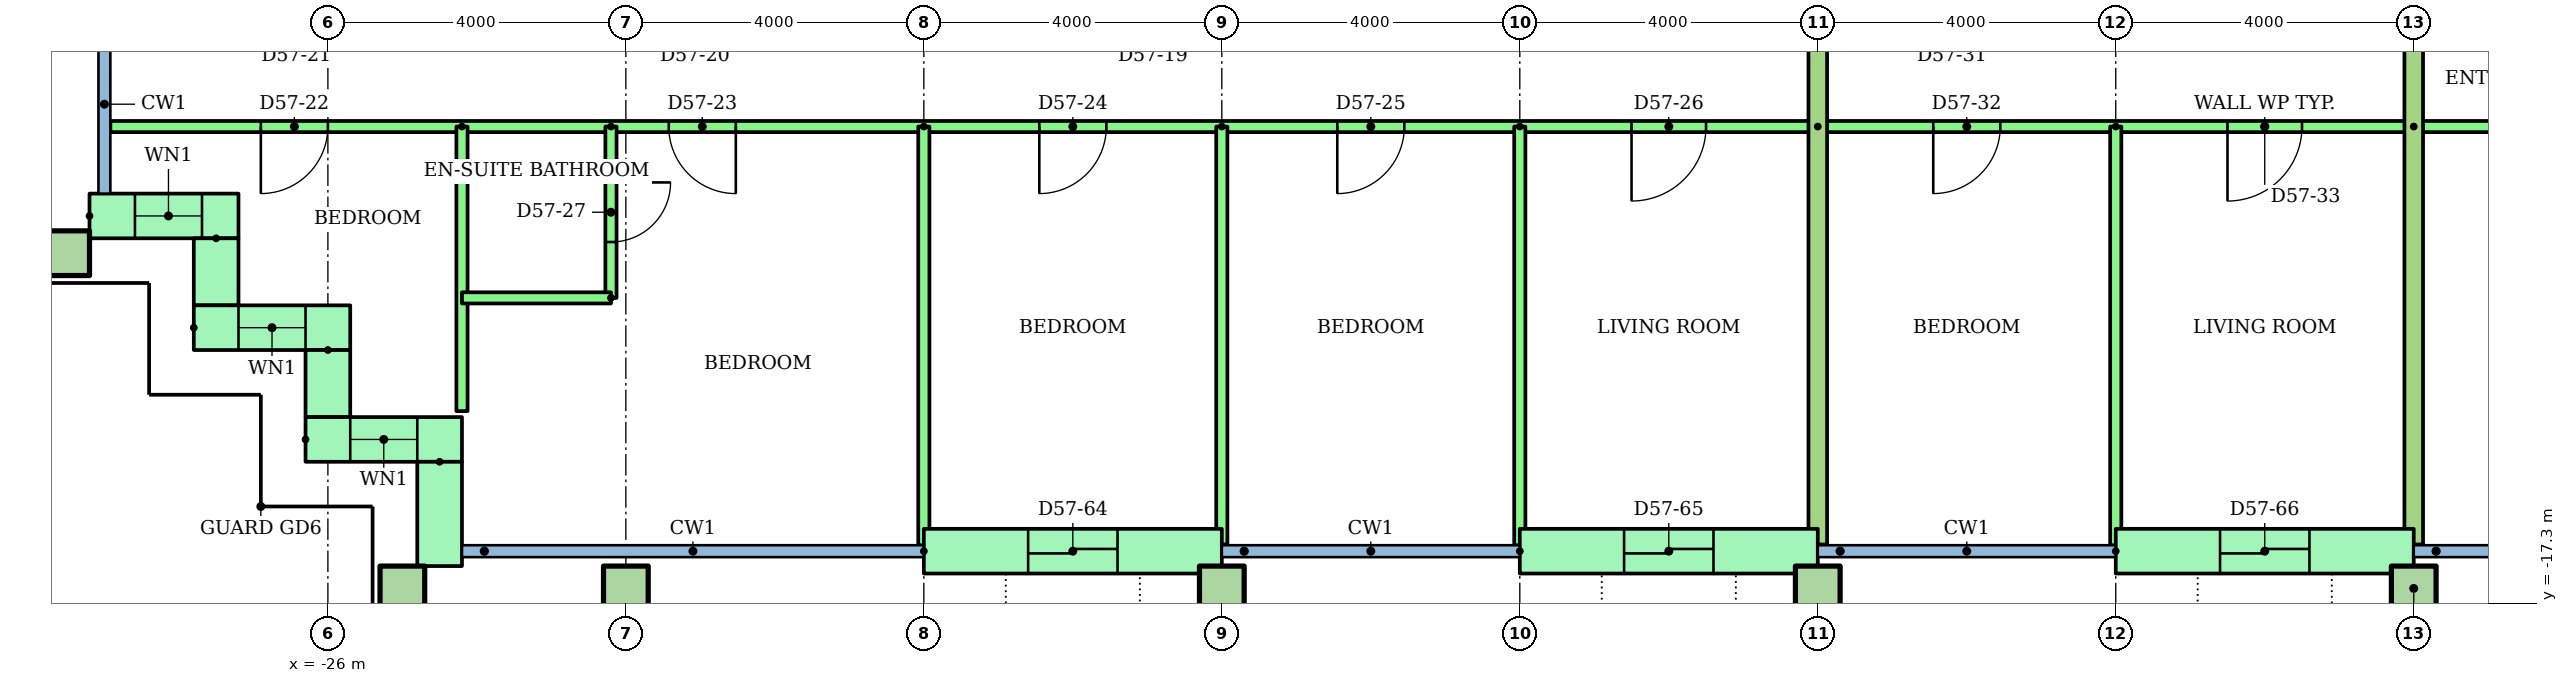
"""IFC4 building model, lengths in metres.
Left out: names, types, materials, properties, quantities, classifications, styles, units other than length and angle.
Written with IfcOpenShell. Run it as: python <this file> out.ifc"""

import sys

from ifc_helpers import new_model, si_unit, direction, frame, frame_2d, origin, origin_2d, place, context, subcontext, project, spatial, rectangle, hollow_rectangle, extrude, element, fill, save


model = new_model("IFC4")
c1 = context("Model", 3, precision=1e-05, world=origin(), true_north=direction((0.0, 1.0)))
c2 = subcontext(c1, "Body", "Model", "MODEL_VIEW")
j1 = project(units=[si_unit("LENGTHUNIT", "METRE"), si_unit("PLANEANGLEUNIT", "RADIAN")], contexts=[c1])
p1 = place(None, origin())
s1 = spatial("IfcSite", under=j1, at=p1, CompositionType="ELEMENT")
p2 = place(p1, origin())
s2 = spatial("IfcBuilding", under=s1, at=p2, CompositionType="ELEMENT")
p3 = place(p2, frame((0.0, 0.0, 220.4)))
s3 = spatial("IfcBuildingStorey", under=s2, at=p3, CompositionType="ELEMENT", Elevation=220.4)
for number, where in (
    (1, (-25.0, -17.1, 0.0)),
    (2, (-22.0, -17.1, 0.0)),
    (3, (-14.0, -17.1, 0.0)),
    (4, (-6.0, -17.1, 0.0)),
    (5, (2.0, -17.1, 0.0)),
    (6, (-29.5, -12.6, 0.0)),
):
    element("IfcColumn", number, at=place(p3, frame(where)), inside=s3, PredefinedType="COLUMN", context=c2, shape_type="SweptSolid", body=[
        extrude(hollow_rectangle(XDim=0.6, YDim=0.6, WallThickness=0.03, at=origin_2d()), origin(), (0.0, 0.0, 1.0), 3.2),
    ])
p4 = place(p3, frame((-29.2, -12.1, 0.0)))
e7 = element("IfcWall", 7, at=p4, inside=s3, PredefinedType="STANDARD", context=c2, shape_type="SweptSolid", body=[
    extrude(rectangle(XDim=2.0, YDim=0.6, at=frame_2d((1.0, 0.0))), origin(), (0.0, 0.0, 1.0), 2.92),
])
p5 = place(p4, frame((0.61, 0.0, 0.9)))
e8 = element("IfcOpeningElement", 8, at=p5, cuts=e7, PredefinedType="OPENING", context=c2, shape_type="SweptSolid", body=[
    extrude(rectangle(XDim=0.9, YDim=1.5, at=frame_2d((0.45, 0.75))), frame((0.0, 0.31, 0.0), z_axis=(0.0, -1.0, 0.0), x_axis=(1.0, 0.0, 0.0)), (0.0, 0.0, 1.0), 0.62),
])
p6 = place(p3, frame((-27.5, -12.4, 0.0), z_axis=(0.0, 0.0, 1.0), x_axis=(0.0, -1.0, 0.0)))
e9 = element("IfcWall", 9, at=p6, inside=s3, PredefinedType="STANDARD", context=c2, shape_type="SweptSolid", body=[
    extrude(rectangle(XDim=0.9, YDim=0.6, at=frame_2d((0.45, 0.0))), origin(), (0.0, 0.0, 1.0), 2.92),
])
p7 = place(p3, frame((-27.8, -13.6, 0.0)))
e10 = element("IfcWall", 10, at=p7, inside=s3, PredefinedType="STANDARD", context=c2, shape_type="SweptSolid", body=[
    extrude(rectangle(XDim=2.1, YDim=0.6, at=frame_2d((1.05, 0.0))), origin(), (0.0, 0.0, 1.0), 2.92),
])
p8 = place(p7, frame((0.6, 0.0, 0.9)))
e11 = element("IfcOpeningElement", 11, at=p8, cuts=e10, PredefinedType="OPENING", context=c2, shape_type="SweptSolid", body=[
    extrude(rectangle(XDim=0.9, YDim=1.5, at=frame_2d((0.45, 0.75))), frame((0.0, 0.31, 0.0), z_axis=(0.0, -1.0, 0.0), x_axis=(1.0, 0.0, 0.0)), (0.0, 0.0, 1.0), 0.62),
])
p9 = place(p3, frame((-26.0, -13.9, 0.0), z_axis=(0.0, 0.0, 1.0), x_axis=(0.0, -1.0, 0.0)))
e12 = element("IfcWall", 12, at=p9, inside=s3, PredefinedType="STANDARD", context=c2, shape_type="SweptSolid", body=[
    extrude(rectangle(XDim=0.9, YDim=0.6, at=frame_2d((0.45, 0.0))), origin(), (0.0, 0.0, 1.0), 2.92),
])
p10 = place(p3, frame((-26.3, -15.1, 0.0)))
e13 = element("IfcWall", 13, at=p10, inside=s3, PredefinedType="STANDARD", context=c2, shape_type="SweptSolid", body=[
    extrude(rectangle(XDim=2.1, YDim=0.6, at=frame_2d((1.05, 0.0))), origin(), (0.0, 0.0, 1.0), 2.92),
])
p11 = place(p10, frame((0.6, 0.0, 0.9)))
e14 = element("IfcOpeningElement", 14, at=p11, cuts=e13, PredefinedType="OPENING", context=c2, shape_type="SweptSolid", body=[
    extrude(rectangle(XDim=0.9, YDim=1.5, at=frame_2d((0.45, 0.75))), frame((0.0, 0.31, 0.0), z_axis=(0.0, -1.0, 0.0), x_axis=(1.0, 0.0, 0.0)), (0.0, 0.0, 1.0), 0.62),
])
p12 = place(p3, frame((-24.5, -15.4, 0.0), z_axis=(0.0, 0.0, 1.0), x_axis=(0.0, -1.0, 0.0)))
e15 = element("IfcWall", 15, at=p12, inside=s3, PredefinedType="STANDARD", context=c2, shape_type="SweptSolid", body=[
    extrude(rectangle(XDim=1.4, YDim=0.6, at=frame_2d((0.7, 0.0))), origin(), (0.0, 0.0, 1.0), 2.92),
])
p13 = place(p3, frame((-18.0, -16.6, 0.0)))
e16 = element("IfcWall", 16, at=p13, inside=s3, PredefinedType="STANDARD", context=c2, shape_type="SweptSolid", body=[
    extrude(rectangle(XDim=4.0, YDim=0.6, at=frame_2d((2.0, 0.0))), origin(), (0.0, 0.0, 1.0), 2.92),
])
p14 = place(p13, frame((1.4, 0.0, 0.0)))
e17 = element("IfcOpeningElement", 17, at=p14, cuts=e16, PredefinedType="OPENING", context=c2, shape_type="SweptSolid", body=[
    extrude(rectangle(XDim=1.2, YDim=2.1, at=frame_2d((0.6, 1.05))), frame((0.0, 0.31, 0.0), z_axis=(0.0, -1.0, 0.0), x_axis=(1.0, 0.0, 0.0)), (0.0, 0.0, 1.0), 0.62),
])
p15 = place(p3, frame((-10.0, -16.6, 0.0)))
e18 = element("IfcWall", 18, at=p15, inside=s3, PredefinedType="STANDARD", context=c2, shape_type="SweptSolid", body=[
    extrude(rectangle(XDim=4.0, YDim=0.6, at=frame_2d((2.0, 0.0))), origin(), (0.0, 0.0, 1.0), 2.92),
])
p16 = place(p15, frame((1.4, 0.0, 0.0)))
e19 = element("IfcOpeningElement", 19, at=p16, cuts=e18, PredefinedType="OPENING", context=c2, shape_type="SweptSolid", body=[
    extrude(rectangle(XDim=1.2, YDim=2.1, at=frame_2d((0.6, 1.05))), frame((0.0, 0.31, 0.0), z_axis=(0.0, -1.0, 0.0), x_axis=(1.0, 0.0, 0.0)), (0.0, 0.0, 1.0), 0.62),
])
p17 = place(p3, frame((-2.0, -16.6, 0.0)))
e20 = element("IfcWall", 20, at=p17, inside=s3, PredefinedType="STANDARD", context=c2, shape_type="SweptSolid", body=[
    extrude(rectangle(XDim=4.0, YDim=0.6, at=frame_2d((2.0, 0.0))), origin(), (0.0, 0.0, 1.0), 2.92),
])
p18 = place(p17, frame((1.4, 0.0, 0.0)))
e21 = element("IfcOpeningElement", 21, at=p18, cuts=e20, PredefinedType="OPENING", context=c2, shape_type="SweptSolid", body=[
    extrude(rectangle(XDim=1.2, YDim=2.1, at=frame_2d((0.6, 1.05))), frame((0.0, 0.31, 0.0), z_axis=(0.0, -1.0, 0.0), x_axis=(1.0, 0.0, 0.0)), (0.0, 0.0, 1.0), 0.62),
])
p19 = place(p3, frame((-6.0, -10.9, 0.0), z_axis=(0.0, 0.0, 1.0), x_axis=(-1.0, 0.0, 0.0)))
e22 = element("IfcWall", 22, at=p19, inside=s3, PredefinedType="PARTITIONING", context=c2, shape_type="SweptSolid", body=[
    extrude(rectangle(XDim=22.92, YDim=0.15, at=frame_2d((11.46, 0.0))), origin(), (0.0, 0.0, 1.0), 2.4),
])
p20 = place(p19, frame((20.0, 0.0, 0.0)))
e23 = element("IfcOpeningElement", 23, at=p20, cuts=e22, PredefinedType="OPENING", context=c2, shape_type="SweptSolid", body=[
    extrude(rectangle(XDim=0.9, YDim=2.1, at=frame_2d((0.45, 1.05))), frame((0.0, 0.085, 0.0), z_axis=(0.0, -1.0, 0.0), x_axis=(1.0, 0.0, 0.0)), (0.0, 0.0, 1.0), 0.17),
])
p21 = place(p19, frame((14.524, 0.0, 0.0)))
e24 = element("IfcOpeningElement", 24, at=p21, cuts=e22, PredefinedType="OPENING", context=c2, shape_type="SweptSolid", body=[
    extrude(rectangle(XDim=0.9, YDim=2.1, at=frame_2d((0.45, 1.05))), frame((0.0, 0.085, 0.0), z_axis=(0.0, -1.0, 0.0), x_axis=(1.0, 0.0, 0.0)), (0.0, 0.0, 1.0), 0.17),
])
p22 = place(p19, frame((9.55, 0.0, 0.0)))
e25 = element("IfcOpeningElement", 25, at=p22, cuts=e22, PredefinedType="OPENING", context=c2, shape_type="SweptSolid", body=[
    extrude(rectangle(XDim=0.9, YDim=2.1, at=frame_2d((0.45, 1.05))), frame((0.0, 0.085, 0.0), z_axis=(0.0, -1.0, 0.0), x_axis=(1.0, 0.0, 0.0)), (0.0, 0.0, 1.0), 0.17),
])
p23 = place(p19, frame((5.55, 0.0, 0.0)))
e26 = element("IfcOpeningElement", 26, at=p23, cuts=e22, PredefinedType="OPENING", context=c2, shape_type="SweptSolid", body=[
    extrude(rectangle(XDim=0.9, YDim=2.1, at=frame_2d((0.45, 1.05))), frame((0.0, 0.085, 0.0), z_axis=(0.0, -1.0, 0.0), x_axis=(1.0, 0.0, 0.0)), (0.0, 0.0, 1.0), 0.17),
])
p24 = place(p19, frame((1.5, 0.0, 0.0)))
e27 = element("IfcOpeningElement", 27, at=p24, cuts=e22, PredefinedType="OPENING", context=c2, shape_type="SweptSolid", body=[
    extrude(rectangle(XDim=1.0, YDim=2.1, at=frame_2d((0.5, 1.05))), frame((0.0, 0.085, 0.0), z_axis=(0.0, -1.0, 0.0), x_axis=(1.0, 0.0, 0.0)), (0.0, 0.0, 1.0), 0.17),
])
p25 = place(p3, frame((-24.2, -10.9, 0.0), z_axis=(0.0, 0.0, 1.0), x_axis=(0.0, -1.0, 0.0)))
e28 = element("IfcWall", 28, at=p25, inside=s3, PredefinedType="PARTITIONING", context=c2, shape_type="SweptSolid", body=[
    extrude(rectangle(XDim=3.82, YDim=0.15, at=frame_2d((1.91, 0.0))), origin(), (0.0, 0.0, 1.0), 2.4),
])
p26 = place(p3, frame((-18.0, -10.9, 0.0), z_axis=(0.0, 0.0, 1.0), x_axis=(0.0, -1.0, 0.0)))
e29 = element("IfcWall", 29, at=p26, inside=s3, PredefinedType="PARTITIONING", context=c2, shape_type="SweptSolid", body=[
    extrude(rectangle(XDim=5.621, YDim=0.15, at=frame_2d((2.811, 0.0))), origin(), (0.0, 0.0, 1.0), 2.4),
])
p27 = place(p3, frame((-14.0, -10.9, 0.0), z_axis=(0.0, 0.0, 1.0), x_axis=(0.0, -1.0, 0.0)))
e30 = element("IfcWall", 30, at=p27, inside=s3, PredefinedType="PARTITIONING", context=c2, shape_type="SweptSolid", body=[
    extrude(rectangle(XDim=5.61, YDim=0.15, at=frame_2d((2.805, 0.0))), origin(), (0.0, 0.0, 1.0), 2.4),
])
p28 = place(p3, frame((-10.0, -10.9, 0.0), z_axis=(0.0, 0.0, 1.0), x_axis=(0.0, -1.0, 0.0)))
e31 = element("IfcWall", 31, at=p28, inside=s3, PredefinedType="PARTITIONING", context=c2, shape_type="SweptSolid", body=[
    extrude(rectangle(XDim=5.621, YDim=0.15, at=frame_2d((2.811, 0.0))), origin(), (0.0, 0.0, 1.0), 2.4),
])
p29 = place(p3, frame((-22.2, -10.9, 0.0), z_axis=(0.0, 0.0, 1.0), x_axis=(0.0, -1.0, 0.0)))
e32 = element("IfcWall", 32, at=p29, inside=s3, PredefinedType="PARTITIONING", context=c2, shape_type="SweptSolid", body=[
    extrude(rectangle(XDim=2.3, YDim=0.15, at=frame_2d((1.15, 0.0))), origin(), (0.0, 0.0, 1.0), 2.4),
])
p30 = place(p29, frame((0.75, 0.0, 0.0)))
e33 = element("IfcOpeningElement", 33, at=p30, cuts=e32, PredefinedType="OPENING", context=c2, shape_type="SweptSolid", body=[
    extrude(rectangle(XDim=0.8, YDim=2.1, at=frame_2d((0.4, 1.05))), frame((0.0, 0.085, 0.0), z_axis=(0.0, -1.0, 0.0), x_axis=(1.0, 0.0, 0.0)), (0.0, 0.0, 1.0), 0.17),
])
p31 = place(p3, frame((-22.2, -13.2, 0.0), z_axis=(0.0, 0.0, 1.0), x_axis=(-1.0, 0.0, 0.0)))
e34 = element("IfcWall", 34, at=p31, inside=s3, PredefinedType="PARTITIONING", context=c2, shape_type="SweptSolid", body=[
    extrude(rectangle(XDim=2.0, YDim=0.15, at=frame_2d((1.0, 0.0))), origin(), (0.0, 0.0, 1.0), 2.4),
])
p32 = place(p3, frame((2.0, -10.9, 0.0), z_axis=(0.0, 0.0, 1.0), x_axis=(-1.0, 0.0, 0.0)))
e35 = element("IfcWall", 35, at=p32, inside=s3, PredefinedType="PARTITIONING", context=c2, shape_type="SweptSolid", body=[
    extrude(rectangle(XDim=8.0, YDim=0.15, at=frame_2d((4.0, 0.0))), origin(), (0.0, 0.0, 1.0), 2.4),
])
p33 = place(p32, frame((5.55, 0.0, 0.0)))
e36 = element("IfcOpeningElement", 36, at=p33, cuts=e35, PredefinedType="OPENING", context=c2, shape_type="SweptSolid", body=[
    extrude(rectangle(XDim=0.9, YDim=2.1, at=frame_2d((0.45, 1.05))), frame((0.0, 0.085, 0.0), z_axis=(0.0, -1.0, 0.0), x_axis=(1.0, 0.0, 0.0)), (0.0, 0.0, 1.0), 0.17),
])
p34 = place(p32, frame((1.5, 0.0, 0.0)))
e37 = element("IfcOpeningElement", 37, at=p34, cuts=e35, PredefinedType="OPENING", context=c2, shape_type="SweptSolid", body=[
    extrude(rectangle(XDim=1.0, YDim=2.1, at=frame_2d((0.5, 1.05))), frame((0.0, 0.085, 0.0), z_axis=(0.0, -1.0, 0.0), x_axis=(1.0, 0.0, 0.0)), (0.0, 0.0, 1.0), 0.17),
])
p35 = place(p3, frame((-2.0, -10.9, 0.0), z_axis=(0.0, 0.0, 1.0), x_axis=(0.0, -1.0, 0.0)))
e38 = element("IfcWall", 38, at=p35, inside=s3, PredefinedType="PARTITIONING", context=c2, shape_type="SweptSolid", body=[
    extrude(rectangle(XDim=5.621, YDim=0.15, at=frame_2d((2.811, 0.0))), origin(), (0.0, 0.0, 1.0), 2.4),
])
p36 = place(p3, frame((-6.0, -1.4, 0.0), z_axis=(0.0, 0.0, 1.0), x_axis=(0.0, -1.0, 0.0)))
e39 = element("IfcWall", 39, at=p36, inside=s3, PredefinedType="PARTITIONING", context=c2, shape_type="SweptSolid", body=[
    extrude(rectangle(XDim=15.11, YDim=0.25, at=frame_2d((7.555, 0.0))), origin(), (0.0, 0.0, 1.0), 2.4),
])
p37 = place(p3, frame((28.92, -10.9, 0.0), z_axis=(0.0, 0.0, 1.0), x_axis=(-1.0, 0.0, 0.0)))
e40 = element("IfcWall", 40, at=p37, inside=s3, PredefinedType="PARTITIONING", context=c2, shape_type="SweptSolid", body=[
    extrude(rectangle(XDim=26.92, YDim=0.15, at=frame_2d((13.46, 0.0))), origin(), (0.0, 0.0, 1.0), 2.4),
])
p38 = place(p37, frame((22.42, 0.0, 0.0)))
e41 = element("IfcOpeningElement", 41, at=p38, cuts=e40, PredefinedType="OPENING", context=c2, shape_type="SweptSolid", body=[
    extrude(rectangle(XDim=1.0, YDim=2.1, at=frame_2d((0.5, 1.05))), frame((0.0, 0.085, 0.0), z_axis=(0.0, -1.0, 0.0), x_axis=(1.0, 0.0, 0.0)), (0.0, 0.0, 1.0), 0.17),
])
p39 = place(p37, frame((16.47, 0.0, 0.0)))
e42 = element("IfcOpeningElement", 42, at=p39, cuts=e40, PredefinedType="OPENING", context=c2, shape_type="SweptSolid", body=[
    extrude(rectangle(XDim=0.9, YDim=2.1, at=frame_2d((0.45, 1.05))), frame((0.0, 0.085, 0.0), z_axis=(0.0, -1.0, 0.0), x_axis=(1.0, 0.0, 0.0)), (0.0, 0.0, 1.0), 0.17),
])
p40 = place(p37, frame((12.47, 0.0, 0.0)))
e43 = element("IfcOpeningElement", 43, at=p40, cuts=e40, PredefinedType="OPENING", context=c2, shape_type="SweptSolid", body=[
    extrude(rectangle(XDim=0.9, YDim=2.1, at=frame_2d((0.45, 1.05))), frame((0.0, 0.085, 0.0), z_axis=(0.0, -1.0, 0.0), x_axis=(1.0, 0.0, 0.0)), (0.0, 0.0, 1.0), 0.17),
])
p41 = place(p37, frame((7.27, 0.0, 0.0)))
e44 = element("IfcOpeningElement", 44, at=p41, cuts=e40, PredefinedType="OPENING", context=c2, shape_type="SweptSolid", body=[
    extrude(rectangle(XDim=0.9, YDim=2.1, at=frame_2d((0.45, 1.05))), frame((0.0, 0.085, 0.0), z_axis=(0.0, -1.0, 0.0), x_axis=(1.0, 0.0, 0.0)), (0.0, 0.0, 1.0), 0.17),
])
p42 = place(p37, frame((1.544, 0.0, 0.0)))
e45 = element("IfcOpeningElement", 45, at=p42, cuts=e40, PredefinedType="OPENING", context=c2, shape_type="SweptSolid", body=[
    extrude(rectangle(XDim=0.9, YDim=2.1, at=frame_2d((0.45, 1.05))), frame((0.0, 0.085, 0.0), z_axis=(0.0, -1.0, 0.0), x_axis=(1.0, 0.0, 0.0)), (0.0, 0.0, 1.0), 0.17),
])
p43 = place(p3, frame((2.0, -1.4, 0.0), z_axis=(0.0, 0.0, 1.0), x_axis=(0.0, -1.0, 0.0)))
e46 = element("IfcWall", 46, at=p43, inside=s3, PredefinedType="PARTITIONING", context=c2, shape_type="SweptSolid", body=[
    extrude(rectangle(XDim=15.11, YDim=0.25, at=frame_2d((7.555, 0.0))), origin(), (0.0, 0.0, 1.0), 2.4),
])
p44 = place(p5, origin())
e47 = element("IfcWindow", 47, at=p44, inside=s3, PartitioningType="SINGLE_PANEL", PredefinedType="WINDOW", context=c2, shape_type="SweptSolid", body=[
    extrude(rectangle(XDim=0.9, YDim=1.5, at=frame_2d((0.45, 0.75))), frame((0.0, 0.03, 0.0), z_axis=(0.0, -1.0, 0.0), x_axis=(1.0, 0.0, 0.0)), (0.0, 0.0, 1.0), 0.06),
])
fill(e8, e47)
p45 = place(p8, origin())
e48 = element("IfcWindow", 48, at=p45, inside=s3, PartitioningType="SINGLE_PANEL", PredefinedType="WINDOW", context=c2, shape_type="SweptSolid", body=[
    extrude(rectangle(XDim=0.9, YDim=1.5, at=frame_2d((0.45, 0.75))), frame((0.0, 0.03, 0.0), z_axis=(0.0, -1.0, 0.0), x_axis=(1.0, 0.0, 0.0)), (0.0, 0.0, 1.0), 0.06),
])
fill(e11, e48)
p46 = place(p11, origin())
e49 = element("IfcWindow", 49, at=p46, inside=s3, PartitioningType="SINGLE_PANEL", PredefinedType="WINDOW", context=c2, shape_type="SweptSolid", body=[
    extrude(rectangle(XDim=0.9, YDim=1.5, at=frame_2d((0.45, 0.75))), frame((0.0, 0.03, 0.0), z_axis=(0.0, -1.0, 0.0), x_axis=(1.0, 0.0, 0.0)), (0.0, 0.0, 1.0), 0.06),
])
fill(e14, e49)
p47 = place(p20, origin())
e50 = element("IfcDoor", 50, at=p47, inside=s3, OperationType="SINGLE_SWING_RIGHT", PredefinedType="DOOR", context=c2, shape_type="SweptSolid", body=[
    extrude(rectangle(XDim=0.9, YDim=2.1, at=frame_2d((0.45, 1.05))), frame((0.0, 0.025, 0.0), z_axis=(0.0, -1.0, 0.0), x_axis=(1.0, 0.0, 0.0)), (0.0, 0.0, 1.0), 0.05),
])
fill(e23, e50)
p48 = place(p21, origin())
e51 = element("IfcDoor", 51, at=p48, inside=s3, OperationType="SINGLE_SWING_LEFT", PredefinedType="DOOR", context=c2, shape_type="SweptSolid", body=[
    extrude(rectangle(XDim=0.9, YDim=2.1, at=frame_2d((0.45, 1.05))), frame((0.0, 0.025, 0.0), z_axis=(0.0, -1.0, 0.0), x_axis=(1.0, 0.0, 0.0)), (0.0, 0.0, 1.0), 0.05),
])
fill(e24, e51)
p49 = place(p22, origin())
e52 = element("IfcDoor", 52, at=p49, inside=s3, OperationType="SINGLE_SWING_RIGHT", PredefinedType="DOOR", context=c2, shape_type="SweptSolid", body=[
    extrude(rectangle(XDim=0.9, YDim=2.1, at=frame_2d((0.45, 1.05))), frame((0.0, 0.025, 0.0), z_axis=(0.0, -1.0, 0.0), x_axis=(1.0, 0.0, 0.0)), (0.0, 0.0, 1.0), 0.05),
])
fill(e25, e52)
p50 = place(p23, origin())
e53 = element("IfcDoor", 53, at=p50, inside=s3, OperationType="SINGLE_SWING_RIGHT", PredefinedType="DOOR", context=c2, shape_type="SweptSolid", body=[
    extrude(rectangle(XDim=0.9, YDim=2.1, at=frame_2d((0.45, 1.05))), frame((0.0, 0.025, 0.0), z_axis=(0.0, -1.0, 0.0), x_axis=(1.0, 0.0, 0.0)), (0.0, 0.0, 1.0), 0.05),
])
fill(e26, e53)
p51 = place(p24, origin())
e54 = element("IfcDoor", 54, at=p51, inside=s3, OperationType="SINGLE_SWING_RIGHT", PredefinedType="DOOR", context=c2, shape_type="SweptSolid", body=[
    extrude(rectangle(XDim=1.0, YDim=2.1, at=frame_2d((0.5, 1.05))), frame((0.0, 0.025, 0.0), z_axis=(0.0, -1.0, 0.0), x_axis=(1.0, 0.0, 0.0)), (0.0, 0.0, 1.0), 0.05),
])
fill(e27, e54)
p52 = place(p30, origin())
e55 = element("IfcDoor", 55, at=p52, inside=s3, OperationType="SINGLE_SWING_LEFT", PredefinedType="DOOR", context=c2, shape_type="SweptSolid", body=[
    extrude(rectangle(XDim=0.8, YDim=2.1, at=frame_2d((0.4, 1.05))), frame((0.0, 0.025, 0.0), z_axis=(0.0, -1.0, 0.0), x_axis=(1.0, 0.0, 0.0)), (0.0, 0.0, 1.0), 0.05),
])
fill(e33, e55)
p53 = place(p33, origin())
e56 = element("IfcDoor", 56, at=p53, inside=s3, OperationType="SINGLE_SWING_RIGHT", PredefinedType="DOOR", context=c2, shape_type="SweptSolid", body=[
    extrude(rectangle(XDim=0.9, YDim=2.1, at=frame_2d((0.45, 1.05))), frame((0.0, 0.025, 0.0), z_axis=(0.0, -1.0, 0.0), x_axis=(1.0, 0.0, 0.0)), (0.0, 0.0, 1.0), 0.05),
])
fill(e36, e56)
p54 = place(p34, origin())
e57 = element("IfcDoor", 57, at=p54, inside=s3, OperationType="SINGLE_SWING_RIGHT", PredefinedType="DOOR", context=c2, shape_type="SweptSolid", body=[
    extrude(rectangle(XDim=1.0, YDim=2.1, at=frame_2d((0.5, 1.05))), frame((0.0, 0.025, 0.0), z_axis=(0.0, -1.0, 0.0), x_axis=(1.0, 0.0, 0.0)), (0.0, 0.0, 1.0), 0.05),
])
fill(e37, e57)
p55 = place(p14, origin())
e58 = element("IfcDoor", 58, at=p55, inside=s3, OperationType="SLIDING_TO_LEFT", PredefinedType="DOOR", context=c2, shape_type="SweptSolid", body=[
    extrude(rectangle(XDim=1.2, YDim=2.1, at=frame_2d((0.6, 1.05))), frame((0.0, 0.025, 0.0), z_axis=(0.0, -1.0, 0.0), x_axis=(1.0, 0.0, 0.0)), (0.0, 0.0, 1.0), 0.05),
])
fill(e17, e58)
p56 = place(p16, origin())
e59 = element("IfcDoor", 59, at=p56, inside=s3, OperationType="SLIDING_TO_LEFT", PredefinedType="DOOR", context=c2, shape_type="SweptSolid", body=[
    extrude(rectangle(XDim=1.2, YDim=2.1, at=frame_2d((0.6, 1.05))), frame((0.0, 0.025, 0.0), z_axis=(0.0, -1.0, 0.0), x_axis=(1.0, 0.0, 0.0)), (0.0, 0.0, 1.0), 0.05),
])
fill(e19, e59)
p57 = place(p18, origin())
e60 = element("IfcDoor", 60, at=p57, inside=s3, OperationType="SLIDING_TO_LEFT", PredefinedType="DOOR", context=c2, shape_type="SweptSolid", body=[
    extrude(rectangle(XDim=1.2, YDim=2.1, at=frame_2d((0.6, 1.05))), frame((0.0, 0.025, 0.0), z_axis=(0.0, -1.0, 0.0), x_axis=(1.0, 0.0, 0.0)), (0.0, 0.0, 1.0), 0.05),
])
fill(e21, e60)
save(model, sys.argv[1])
